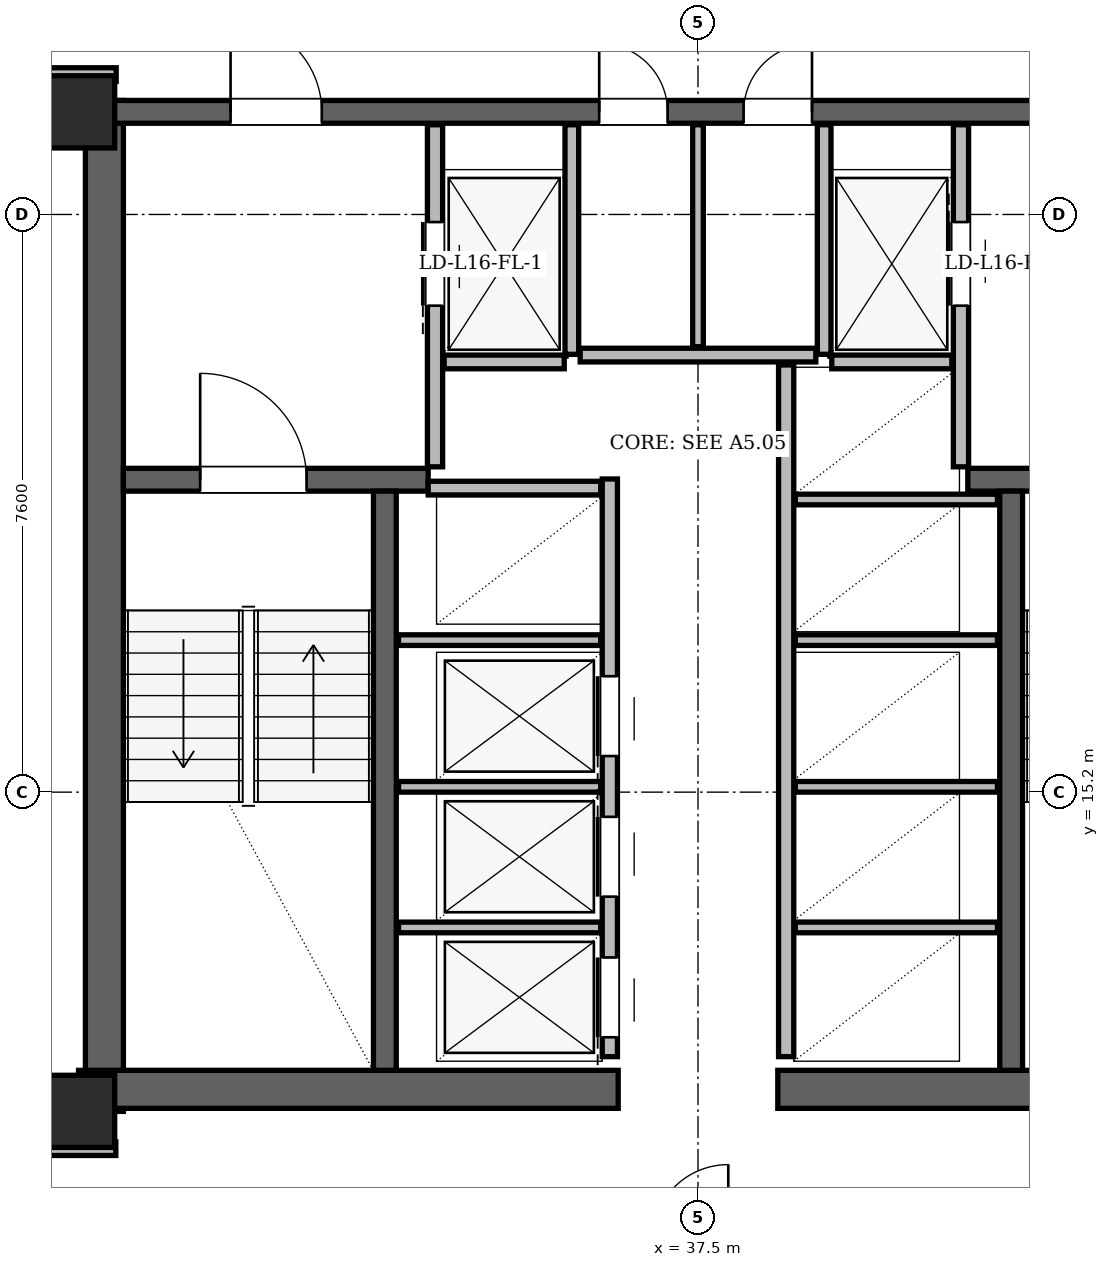
"""IFC4 building model, lengths in metres.
Left out: names, types, materials, properties, quantities, classifications, styles, units other than length and angle.
Written with IfcOpenShell. Run it as: python <this file> out.ifc"""

import sys

from ifc_helpers import new_model, si_unit, direction, frame, frame_2d, origin, origin_2d, place, context, subcontext, project, spatial, rectangle, hollow_rectangle, extrude, element, fill, save


model = new_model("IFC4")
c1 = context("Model", 3, precision=1e-05, world=origin(), true_north=direction((0.0, 1.0)))
c2 = subcontext(c1, "Body", "Model", "MODEL_VIEW")
j1 = project(units=[si_unit("LENGTHUNIT", "METRE"), si_unit("PLANEANGLEUNIT", "RADIAN")], contexts=[c1])
p1 = place(None, origin())
s1 = spatial("IfcSite", under=j1, at=p1, CompositionType="ELEMENT")
p2 = place(p1, origin())
s2 = spatial("IfcBuilding", under=s1, at=p2, CompositionType="ELEMENT")
p3 = place(p2, frame((0.0, 0.0, 63.3)))
s3 = spatial("IfcBuildingStorey", under=s2, at=p3, CompositionType="ELEMENT", Elevation=63.3)
for number, where, z_axis, x_axis in (
    (1, (29.35, 11.0, 0.0), (0.0, 0.0, 1.0), (1.0, 0.0, 0.0)),
    (2, (29.35, 24.15, 0.0), (0.0, 0.0, 1.0), (1.0, 0.0, 0.0)),
):
    element("IfcColumn", number, at=place(p3, frame(where, z_axis=z_axis, x_axis=x_axis)), inside=s3, PredefinedType="COLUMN", context=c2, shape_type="SweptSolid", body=[
        extrude(hollow_rectangle(XDim=0.95, YDim=0.95, WallThickness=0.08, at=origin_2d()), origin(), (0.0, 0.0, 1.0), 3.6),
    ])
p4 = place(p3, frame((29.69, 11.0, 0.0), z_axis=(0.0, 0.0, 1.0), x_axis=(0.0, 1.0, 0.0)))
e3 = element("IfcWall", 3, at=p4, inside=s3, PredefinedType="SHEAR", context=c2, shape_type="SweptSolid", body=[
    extrude(rectangle(XDim=13.3, YDim=0.5, at=frame_2d((6.65, 0.0))), origin(), (0.0, 0.0, 1.0), 3.36),
])
for number, where, z_axis, x_axis in (
    (4, (29.35, 11.29, 0.0), (0.0, 0.0, 1.0), (1.0, 0.0, 0.0)),
    (5, (38.55, 11.29, 0.0), (0.0, 0.0, 1.0), (1.0, 0.0, 0.0)),
):
    element("IfcWall", number, at=place(p3, frame(where, z_axis=z_axis, x_axis=x_axis)), inside=s3, PredefinedType="SHEAR", context=c2, shape_type="SweptSolid", body=[
        extrude(rectangle(XDim=7.1, YDim=0.5, at=frame_2d((3.55, 0.0))), origin(), (0.0, 0.0, 1.0), 3.36),
    ])
p5 = place(p3, frame((29.65, 24.15, 0.0), z_axis=(0.0, 0.0, 1.0), x_axis=(1.0, 0.0, 0.0)))
e6 = element("IfcWall", 6, at=p5, inside=s3, PredefinedType="SHEAR", context=c2, shape_type="SweptSolid", body=[
    extrude(rectangle(XDim=15.7, YDim=0.3, at=frame_2d((7.85, 0.0))), origin(), (0.0, 0.0, 1.0), 3.36),
])
p6 = place(p5, frame((1.7, 0.0, 0.0)))
e7 = element("IfcOpeningElement", 7, at=p6, cuts=e6, PredefinedType="OPENING", context=c2, shape_type="SweptSolid", body=[
    extrude(rectangle(XDim=1.2, YDim=2.2, at=frame_2d((0.6, 1.1))), frame((0.0, 0.15, 0.0), z_axis=(0.0, -1.0, 0.0), x_axis=(1.0, 0.0, 0.0)), (0.0, 0.0, 1.0), 0.3),
])
p7 = place(p5, frame((12.8, 0.0, 0.0)))
e8 = element("IfcOpeningElement", 8, at=p7, cuts=e6, PredefinedType="OPENING", context=c2, shape_type="SweptSolid", body=[
    extrude(rectangle(XDim=1.2, YDim=2.2, at=frame_2d((0.6, 1.1))), frame((0.0, 0.15, 0.0), z_axis=(0.0, -1.0, 0.0), x_axis=(1.0, 0.0, 0.0)), (0.0, 0.0, 1.0), 0.3),
])
p8 = place(p5, frame((6.55, 0.0, 0.0)))
e9 = element("IfcOpeningElement", 9, at=p8, cuts=e6, PredefinedType="OPENING", context=c2, shape_type="SweptSolid", body=[
    extrude(rectangle(XDim=0.9, YDim=2.05, at=frame_2d((0.45, 1.025))), frame((0.0, 0.15, 0.0), z_axis=(0.0, -1.0, 0.0), x_axis=(1.0, 0.0, 0.0)), (0.0, 0.0, 1.0), 0.3),
])
p9 = place(p5, frame((8.45, 0.0, 0.0)))
e10 = element("IfcOpeningElement", 10, at=p9, cuts=e6, PredefinedType="OPENING", context=c2, shape_type="SweptSolid", body=[
    extrude(rectangle(XDim=0.9, YDim=2.05, at=frame_2d((0.45, 1.025))), frame((0.0, 0.15, 0.0), z_axis=(0.0, -1.0, 0.0), x_axis=(1.0, 0.0, 0.0)), (0.0, 0.0, 1.0), 0.3),
])
p10 = place(p3, frame((29.94, 19.31, 0.0), z_axis=(0.0, 0.0, 1.0), x_axis=(1.0, 0.0, 0.0)))
e11 = element("IfcWall", 11, at=p10, inside=s3, PredefinedType="SHEAR", context=c2, shape_type="SweptSolid", body=[
    extrude(rectangle(XDim=4.01, YDim=0.3, at=frame_2d((2.005, 0.0))), origin(), (0.0, 0.0, 1.0), 3.36),
])
p11 = place(p10, frame((1.01, 0.0, 0.0)))
e12 = element("IfcOpeningElement", 12, at=p11, cuts=e11, PredefinedType="OPENING", context=c2, shape_type="SweptSolid", body=[
    extrude(rectangle(XDim=1.4, YDim=2.2, at=frame_2d((0.7, 1.1))), frame((0.0, 0.15, 0.0), z_axis=(0.0, -1.0, 0.0), x_axis=(1.0, 0.0, 0.0)), (0.0, 0.0, 1.0), 0.3),
])
p12 = place(p3, frame((41.05, 19.31, 0.0), z_axis=(0.0, 0.0, 1.0), x_axis=(1.0, 0.0, 0.0)))
e13 = element("IfcWall", 13, at=p12, inside=s3, PredefinedType="SHEAR", context=c2, shape_type="SweptSolid", body=[
    extrude(rectangle(XDim=4.01, YDim=0.3, at=frame_2d((2.005, 0.0))), origin(), (0.0, 0.0, 1.0), 3.36),
])
p13 = place(p12, frame((1.6, 0.0, 0.0)))
e14 = element("IfcOpeningElement", 14, at=p13, cuts=e13, PredefinedType="OPENING", context=c2, shape_type="SweptSolid", body=[
    extrude(rectangle(XDim=1.4, YDim=2.2, at=frame_2d((0.7, 1.1))), frame((0.0, 0.15, 0.0), z_axis=(0.0, -1.0, 0.0), x_axis=(1.0, 0.0, 0.0)), (0.0, 0.0, 1.0), 0.3),
])
for number, where, z_axis, x_axis in (
    (15, (33.38, 11.54, 0.0), (0.0, 0.0, 1.0), (0.0, 1.0, 0.0)),
    (16, (41.62, 11.54, 0.0), (0.0, 0.0, 1.0), (0.0, 1.0, 0.0)),
):
    element("IfcWall", number, at=place(p3, frame(where, z_axis=z_axis, x_axis=x_axis)), inside=s3, PredefinedType="SHEAR", context=c2, shape_type="SweptSolid", body=[
        extrude(rectangle(XDim=7.62, YDim=0.3, at=frame_2d((3.81, 0.0))), origin(), (0.0, 0.0, 1.0), 3.36),
    ])
p14 = place(p3, frame((30.564, 43.546, 0.0), z_axis=(0.0, 0.0, 1.0), x_axis=(-0.500001933811, -0.866024287295, 0.0)))
e17 = element("IfcWall", 17, at=p14, inside=s3, PredefinedType="SOLIDWALL", context=c2, shape_type="SweptSolid", body=[
    extrude(rectangle(XDim=33.675, YDim=0.34, at=frame_2d((16.837, 0.0))), origin(), (0.0, 0.0, 1.0), 2.494),
])
p15 = place(p14, frame((7.714, 0.0, 0.0)))
e18 = element("IfcOpeningElement", 18, at=p15, cuts=e17, PredefinedType="OPENING", context=c2, shape_type="SweptSolid", body=[
    extrude(rectangle(XDim=1.3, YDim=2.2, at=frame_2d((0.65, 1.1))), frame((0.0, 0.17, 0.0), z_axis=(0.0, -1.0, 0.0), x_axis=(1.0, 0.0, 0.0)), (0.0, 0.0, 1.0), 0.34),
])
p16 = place(p14, frame((29.166, 0.0, 0.0)))
e19 = element("IfcOpeningElement", 19, at=p16, cuts=e17, PredefinedType="OPENING", context=c2, shape_type="SweptSolid", body=[
    extrude(rectangle(XDim=1.5, YDim=2.2, at=frame_2d((0.75, 1.1))), frame((0.0, 0.17, 0.0), z_axis=(0.0, -1.0, 0.0), x_axis=(1.0, 0.0, 0.0)), (0.0, 0.0, 1.0), 0.34),
])
p17 = place(p14, frame((12.072, 0.0, 0.85)))
e20 = element("IfcOpeningElement", 20, at=p17, cuts=e17, PredefinedType="OPENING", context=c2, shape_type="SweptSolid", body=[
    extrude(rectangle(XDim=1.8, YDim=1.534, at=frame_2d((0.9, 0.767))), frame((0.0, 0.17, 0.0), z_axis=(0.0, -1.0, 0.0), x_axis=(1.0, 0.0, 0.0)), (0.0, 0.0, 1.0), 0.34),
])
p18 = place(p14, frame((19.109, 0.0, 0.85)))
e21 = element("IfcOpeningElement", 21, at=p18, cuts=e17, PredefinedType="OPENING", context=c2, shape_type="SweptSolid", body=[
    extrude(rectangle(XDim=1.2, YDim=1.48, at=frame_2d((0.6, 0.74))), frame((0.0, 0.17, 0.0), z_axis=(0.0, -1.0, 0.0), x_axis=(1.0, 0.0, 0.0)), (0.0, 0.0, 1.0), 0.34),
])
p19 = place(p14, frame((1.232, 0.0, 0.85)))
e22 = element("IfcOpeningElement", 22, at=p19, cuts=e17, PredefinedType="OPENING", context=c2, shape_type="SweptSolid", body=[
    extrude(rectangle(XDim=1.8, YDim=1.534, at=frame_2d((0.9, 0.767))), frame((0.0, 0.17, 0.0), z_axis=(0.0, -1.0, 0.0), x_axis=(1.0, 0.0, 0.0)), (0.0, 0.0, 1.0), 0.34),
])
p20 = place(p3, frame((34.04, 19.48, 0.0), z_axis=(0.0, 0.0, 1.0), x_axis=(0.0, 1.0, 0.0)))
e23 = element("IfcWall", 23, at=p20, inside=s3, PredefinedType="PARTITIONING", context=c2, shape_type="SweptSolid", body=[
    extrude(rectangle(XDim=4.5, YDim=0.2, at=frame_2d((2.25, 0.0))), origin(), (0.0, 0.0, 1.0), 2.4),
])
p21 = place(p20, frame((2.12, 0.0, 0.0)))
e24 = element("IfcOpeningElement", 24, at=p21, cuts=e23, PredefinedType="OPENING", context=c2, shape_type="SweptSolid", body=[
    extrude(rectangle(XDim=1.1, YDim=2.2, at=frame_2d((0.55, 1.1))), frame((0.0, 0.1, 0.0), z_axis=(0.0, -1.0, 0.0), x_axis=(1.0, 0.0, 0.0)), (0.0, 0.0, 1.0), 0.2),
])
p22 = place(p3, frame((35.84, 20.96, 0.0), z_axis=(0.0, 0.0, 1.0), x_axis=(0.0, 1.0, 0.0)))
e25 = element("IfcWall", 25, at=p22, inside=s3, PredefinedType="PARTITIONING", context=c2, shape_type="SweptSolid", body=[
    extrude(rectangle(XDim=3.02, YDim=0.18, at=frame_2d((1.51, 0.0))), origin(), (0.0, 0.0, 1.0), 2.4),
])
p23 = place(p3, frame((34.16, 20.86, 0.0), z_axis=(0.0, 0.0, 1.0), x_axis=(1.0, 0.0, 0.0)))
e26 = element("IfcWall", 26, at=p23, inside=s3, PredefinedType="PARTITIONING", context=c2, shape_type="SweptSolid", body=[
    extrude(rectangle(XDim=1.58, YDim=0.18, at=frame_2d((0.79, 0.0))), origin(), (0.0, 0.0, 1.0), 3.36),
])
p24 = place(p3, frame((40.96, 19.48, 0.0), z_axis=(0.0, 0.0, 1.0), x_axis=(0.0, 1.0, 0.0)))
e27 = element("IfcWall", 27, at=p24, inside=s3, PredefinedType="PARTITIONING", context=c2, shape_type="SweptSolid", body=[
    extrude(rectangle(XDim=4.5, YDim=0.2, at=frame_2d((2.25, 0.0))), origin(), (0.0, 0.0, 1.0), 2.4),
])
p25 = place(p24, frame((2.12, 0.0, 0.0)))
e28 = element("IfcOpeningElement", 28, at=p25, cuts=e27, PredefinedType="OPENING", context=c2, shape_type="SweptSolid", body=[
    extrude(rectangle(XDim=1.1, YDim=2.2, at=frame_2d((0.55, 1.1))), frame((0.0, 0.1, 0.0), z_axis=(0.0, -1.0, 0.0), x_axis=(1.0, 0.0, 0.0)), (0.0, 0.0, 1.0), 0.2),
])
p26 = place(p3, frame((39.16, 20.96, 0.0), z_axis=(0.0, 0.0, 1.0), x_axis=(0.0, 1.0, 0.0)))
e29 = element("IfcWall", 29, at=p26, inside=s3, PredefinedType="PARTITIONING", context=c2, shape_type="SweptSolid", body=[
    extrude(rectangle(XDim=3.02, YDim=0.18, at=frame_2d((1.51, 0.0))), origin(), (0.0, 0.0, 1.0), 2.4),
])
p27 = place(p3, frame((39.26, 20.86, 0.0), z_axis=(0.0, 0.0, 1.0), x_axis=(1.0, 0.0, 0.0)))
e30 = element("IfcWall", 30, at=p27, inside=s3, PredefinedType="PARTITIONING", context=c2, shape_type="SweptSolid", body=[
    extrude(rectangle(XDim=1.58, YDim=0.18, at=frame_2d((0.79, 0.0))), origin(), (0.0, 0.0, 1.0), 3.36),
])
p28 = place(p3, frame((36.34, 11.72, 0.0), z_axis=(0.0, 0.0, 1.0), x_axis=(0.0, 1.0, 0.0)))
e31 = element("IfcWall", 31, at=p28, inside=s3, PredefinedType="PARTITIONING", context=c2, shape_type="SweptSolid", body=[
    extrude(rectangle(XDim=7.6, YDim=0.2, at=frame_2d((3.8, 0.0))), origin(), (0.0, 0.0, 1.0), 3.36),
])
p29 = place(p28, frame((0.255, 0.0, 0.0)))
e32 = element("IfcOpeningElement", 32, at=p29, cuts=e31, PredefinedType="OPENING", context=c2, shape_type="SweptSolid", body=[
    extrude(rectangle(XDim=1.05, YDim=2.15, at=frame_2d((0.525, 1.075))), frame((0.0, 0.1, 0.0), z_axis=(0.0, -1.0, 0.0), x_axis=(1.0, 0.0, 0.0)), (0.0, 0.0, 1.0), 0.2),
])
p30 = place(p28, frame((2.105, 0.0, 0.0)))
e33 = element("IfcOpeningElement", 33, at=p30, cuts=e31, PredefinedType="OPENING", context=c2, shape_type="SweptSolid", body=[
    extrude(rectangle(XDim=1.05, YDim=2.15, at=frame_2d((0.525, 1.075))), frame((0.0, 0.1, 0.0), z_axis=(0.0, -1.0, 0.0), x_axis=(1.0, 0.0, 0.0)), (0.0, 0.0, 1.0), 0.2),
])
p31 = place(p28, frame((3.955, 0.0, 0.0)))
e34 = element("IfcOpeningElement", 34, at=p31, cuts=e31, PredefinedType="OPENING", context=c2, shape_type="SweptSolid", body=[
    extrude(rectangle(XDim=1.05, YDim=2.15, at=frame_2d((0.525, 1.075))), frame((0.0, 0.1, 0.0), z_axis=(0.0, -1.0, 0.0), x_axis=(1.0, 0.0, 0.0)), (0.0, 0.0, 1.0), 0.2),
])
p32 = place(p3, frame((33.95, 19.2, 0.0), z_axis=(0.0, 0.0, 1.0), x_axis=(1.0, 0.0, 0.0)))
e35 = element("IfcWall", 35, at=p32, inside=s3, PredefinedType="PARTITIONING", context=c2, shape_type="SweptSolid", body=[
    extrude(rectangle(XDim=2.27, YDim=0.18, at=frame_2d((1.135, 0.0))), origin(), (0.0, 0.0, 1.0), 3.36),
])
for number, where, z_axis, x_axis in (
    (36, (33.56, 13.42, 0.0), (0.0, 0.0, 1.0), (1.0, 0.0, 0.0)),
    (37, (33.56, 15.27, 0.0), (0.0, 0.0, 1.0), (1.0, 0.0, 0.0)),
    (38, (33.56, 17.2, 0.0), (0.0, 0.0, 1.0), (1.0, 0.0, 0.0)),
):
    element("IfcWall", number, at=place(p3, frame(where, z_axis=z_axis, x_axis=x_axis)), inside=s3, PredefinedType="PARTITIONING", context=c2, shape_type="SweptSolid", body=[
        extrude(rectangle(XDim=2.66, YDim=0.14, at=frame_2d((1.33, 0.0))), origin(), (0.0, 0.0, 1.0), 3.36),
    ])
p33 = place(p3, frame((38.66, 11.72, 0.0), z_axis=(0.0, 0.0, 1.0), x_axis=(0.0, 1.0, 0.0)))
e39 = element("IfcWall", 39, at=p33, inside=s3, PredefinedType="PARTITIONING", context=c2, shape_type="SweptSolid", body=[
    extrude(rectangle(XDim=9.1, YDim=0.2, at=frame_2d((4.55, 0.0))), origin(), (0.0, 0.0, 1.0), 3.36),
])
for number, where, z_axis, x_axis in (
    (40, (38.78, 13.42, 0.0), (0.0, 0.0, 1.0), (1.0, 0.0, 0.0)),
    (41, (38.78, 15.27, 0.0), (0.0, 0.0, 1.0), (1.0, 0.0, 0.0)),
    (42, (38.78, 17.2, 0.0), (0.0, 0.0, 1.0), (1.0, 0.0, 0.0)),
    (43, (38.78, 19.05, 0.0), (0.0, 0.0, 1.0), (1.0, 0.0, 0.0)),
):
    element("IfcWall", number, at=place(p3, frame(where, z_axis=z_axis, x_axis=x_axis)), inside=s3, PredefinedType="PARTITIONING", context=c2, shape_type="SweptSolid", body=[
        extrude(rectangle(XDim=2.66, YDim=0.14, at=frame_2d((1.33, 0.0))), origin(), (0.0, 0.0, 1.0), 3.36),
    ])
p34 = place(p3, frame((35.95, 20.95, 0.0), z_axis=(0.0, 0.0, 1.0), x_axis=(1.0, 0.0, 0.0)))
e44 = element("IfcWall", 44, at=p34, inside=s3, PredefinedType="PARTITIONING", context=c2, shape_type="SweptSolid", body=[
    extrude(rectangle(XDim=3.1, YDim=0.18, at=frame_2d((1.55, 0.0))), origin(), (0.0, 0.0, 1.0), 3.36),
])
p35 = place(p3, frame((37.5, 21.06, 0.0), z_axis=(0.0, 0.0, 1.0), x_axis=(0.0, 1.0, 0.0)))
e45 = element("IfcWall", 45, at=p35, inside=s3, PredefinedType="PARTITIONING", context=c2, shape_type="SweptSolid", body=[
    extrude(rectangle(XDim=2.92, YDim=0.14, at=frame_2d((1.46, 0.0))), origin(), (0.0, 0.0, 1.0), 2.4),
])
p36 = place(p3, frame((28.86, 10.51, 0.0), z_axis=(0.0, 0.0, 1.0), x_axis=(1.0, 0.0, 0.0)))
e46 = element("IfcWall", 46, at=p36, inside=s3, PredefinedType="PARTITIONING", context=c2, shape_type="SweptSolid", body=[
    extrude(rectangle(XDim=0.98, YDim=0.18, at=frame_2d((0.49, 0.0))), origin(), (0.0, 0.0, 1.0), 2.738),
])
p37 = place(p3, frame((28.855, 24.64, 0.0), z_axis=(0.0, 0.0, 1.0), x_axis=(1.0, 0.0, 0.0)))
e47 = element("IfcWall", 47, at=p37, inside=s3, PredefinedType="PARTITIONING", context=c2, shape_type="SweptSolid", body=[
    extrude(rectangle(XDim=0.99, YDim=0.18, at=frame_2d((0.495, 0.0))), origin(), (0.0, 0.0, 1.0), 2.738),
])
p38 = place(p21, origin())
e48 = element("IfcDoor", 48, at=p38, inside=s3, OperationType="SLIDING_TO_LEFT", PredefinedType="DOOR", context=c2, shape_type="SweptSolid", body=[
    extrude(rectangle(XDim=1.1, YDim=2.2, at=frame_2d((0.55, 1.1))), frame((0.0, 0.025, 0.0), z_axis=(0.0, -1.0, 0.0), x_axis=(1.0, 0.0, 0.0)), (0.0, 0.0, 1.0), 0.05),
])
fill(e24, e48)
p39 = place(p25, origin())
e49 = element("IfcDoor", 49, at=p39, inside=s3, OperationType="SLIDING_TO_RIGHT", PredefinedType="DOOR", context=c2, shape_type="SweptSolid", body=[
    extrude(rectangle(XDim=1.1, YDim=2.2, at=frame_2d((0.55, 1.1))), frame((0.0, 0.025, 0.0), z_axis=(0.0, -1.0, 0.0), x_axis=(1.0, 0.0, 0.0)), (0.0, 0.0, 1.0), 0.05),
])
fill(e28, e49)
p40 = place(p29, origin())
e50 = element("IfcDoor", 50, at=p40, inside=s3, OperationType="SLIDING_TO_LEFT", PredefinedType="DOOR", context=c2, shape_type="SweptSolid", body=[
    extrude(rectangle(XDim=1.05, YDim=2.15, at=frame_2d((0.525, 1.075))), frame((0.0, 0.025, 0.0), z_axis=(0.0, -1.0, 0.0), x_axis=(1.0, 0.0, 0.0)), (0.0, 0.0, 1.0), 0.05),
])
fill(e32, e50)
p41 = place(p30, origin())
e51 = element("IfcDoor", 51, at=p41, inside=s3, OperationType="SLIDING_TO_RIGHT", PredefinedType="DOOR", context=c2, shape_type="SweptSolid", body=[
    extrude(rectangle(XDim=1.05, YDim=2.15, at=frame_2d((0.525, 1.075))), frame((0.0, 0.025, 0.0), z_axis=(0.0, -1.0, 0.0), x_axis=(1.0, 0.0, 0.0)), (0.0, 0.0, 1.0), 0.05),
])
fill(e33, e51)
p42 = place(p31, origin())
e52 = element("IfcDoor", 52, at=p42, inside=s3, OperationType="SLIDING_TO_LEFT", PredefinedType="DOOR", context=c2, shape_type="SweptSolid", body=[
    extrude(rectangle(XDim=1.05, YDim=2.15, at=frame_2d((0.525, 1.075))), frame((0.0, 0.025, 0.0), z_axis=(0.0, -1.0, 0.0), x_axis=(1.0, 0.0, 0.0)), (0.0, 0.0, 1.0), 0.05),
])
fill(e34, e52)
p43 = place(p11, origin())
e53 = element("IfcDoor", 53, at=p43, inside=s3, OperationType="SINGLE_SWING_LEFT", PredefinedType="DOOR", context=c2, shape_type="SweptSolid", body=[
    extrude(rectangle(XDim=1.4, YDim=2.2, at=frame_2d((0.7, 1.1))), frame((0.0, 0.025, 0.0), z_axis=(0.0, -1.0, 0.0), x_axis=(1.0, 0.0, 0.0)), (0.0, 0.0, 1.0), 0.05),
])
fill(e12, e53)
p44 = place(p6, origin())
e54 = element("IfcDoor", 54, at=p44, inside=s3, OperationType="SINGLE_SWING_LEFT", PredefinedType="DOOR", context=c2, shape_type="SweptSolid", body=[
    extrude(rectangle(XDim=1.2, YDim=2.2, at=frame_2d((0.6, 1.1))), frame((0.0, 0.025, 0.0), z_axis=(0.0, -1.0, 0.0), x_axis=(1.0, 0.0, 0.0)), (0.0, 0.0, 1.0), 0.05),
])
fill(e7, e54)
p45 = place(p8, origin())
e55 = element("IfcDoor", 55, at=p45, inside=s3, OperationType="SINGLE_SWING_LEFT", PredefinedType="DOOR", context=c2, shape_type="SweptSolid", body=[
    extrude(rectangle(XDim=0.9, YDim=2.05, at=frame_2d((0.45, 1.025))), frame((0.0, 0.025, 0.0), z_axis=(0.0, -1.0, 0.0), x_axis=(1.0, 0.0, 0.0)), (0.0, 0.0, 1.0), 0.05),
])
fill(e9, e55)
p46 = place(p9, origin())
e56 = element("IfcDoor", 56, at=p46, inside=s3, OperationType="SINGLE_SWING_RIGHT", PredefinedType="DOOR", context=c2, shape_type="SweptSolid", body=[
    extrude(rectangle(XDim=0.9, YDim=2.05, at=frame_2d((0.45, 1.025))), frame((0.0, 0.025, 0.0), z_axis=(0.0, -1.0, 0.0), x_axis=(1.0, 0.0, 0.0)), (0.0, 0.0, 1.0), 0.05),
])
fill(e10, e56)
save(model, sys.argv[1])
